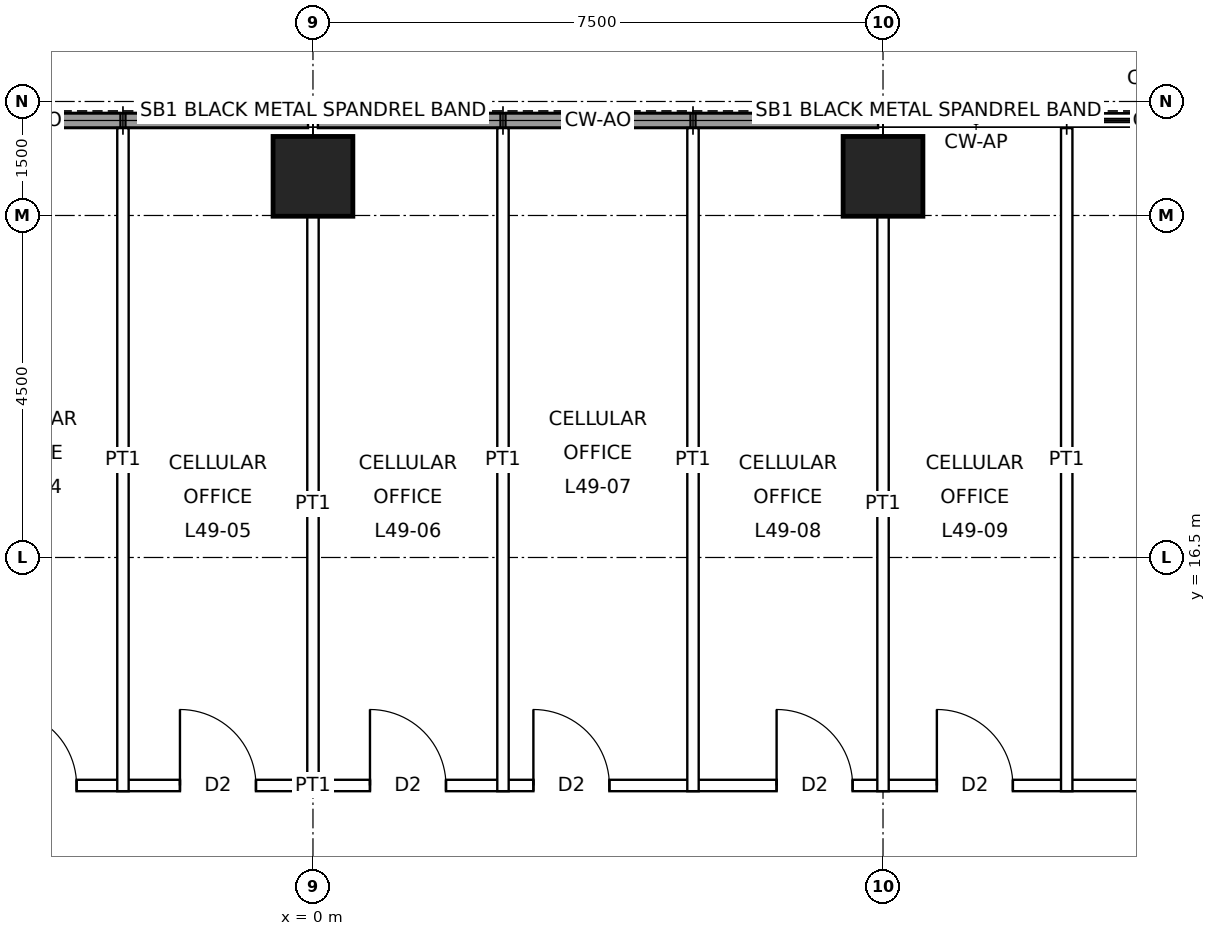
"""IFC4 building model, lengths in metres.
Left out: names, types, materials, properties, quantities, classifications, styles, units other than length and angle.
Written with IfcOpenShell. Run it as: python <this file> out.ifc"""

import sys

from ifc_helpers import new_model, si_unit, direction, frame, frame_2d, origin, origin_2d, place, context, subcontext, project, spatial, rectangle, hollow_rectangle, extrude, element, fill, save


model = new_model("IFC4")
c1 = context("Model", 3, precision=1e-05, world=origin(), true_north=direction((0.0, 1.0)))
c2 = subcontext(c1, "Body", "Model", "MODEL_VIEW")
j1 = project(units=[si_unit("LENGTHUNIT", "METRE"), si_unit("PLANEANGLEUNIT", "RADIAN")], contexts=[c1])
p1 = place(None, origin())
s1 = spatial("IfcSite", under=j1, at=p1, CompositionType="ELEMENT")
p2 = place(p1, origin())
s2 = spatial("IfcBuilding", under=s1, at=p2, CompositionType="ELEMENT")
p3 = place(p2, frame((0.0, 0.0, 229.9)))
s3 = spatial("IfcBuildingStorey", under=s2, at=p3, CompositionType="ELEMENT", Elevation=229.9)
for number, where, z_axis, x_axis in (
    (1, (0.0, 21.515, 0.0), (0.0, 0.0, 1.0), (1.0, 0.0, 0.0)),
    (2, (7.5, 21.515, 0.0), (0.0, 0.0, 1.0), (1.0, 0.0, 0.0)),
):
    element("IfcColumn", number, at=place(p3, frame(where, z_axis=z_axis, x_axis=x_axis)), inside=s3, PredefinedType="COLUMN", context=c2, shape_type="SweptSolid", body=[
        extrude(hollow_rectangle(XDim=1.05, YDim=1.05, WallThickness=0.07, at=origin_2d()), origin(), (0.0, 0.0, 1.0), 4.0),
    ])
p4 = place(p3, frame((-4.968, 22.25, 0.0), z_axis=(0.0, 0.0, 1.0), x_axis=(1.0, 0.0, 0.0)))
e3 = element("IfcWall", 3, at=p4, inside=s3, PredefinedType="SOLIDWALL", context=c2, shape_type="SweptSolid", body=[
    extrude(rectangle(XDim=2.435, YDim=0.2, at=frame_2d((1.218, 0.0))), origin(), (0.0, 0.0, 1.0), 3.85),
])
for number, where, z_axis, x_axis in (
    (4, (-2.468, 22.25, 0.0), (0.0, 0.0, 1.0), (1.0, 0.0, 0.0)),
    (5, (0.065, 22.25, 0.0), (0.0, 0.0, 1.0), (1.0, 0.0, 0.0)),
):
    element("IfcWall", number, at=place(p3, frame(where, z_axis=z_axis, x_axis=x_axis)), inside=s3, PredefinedType="SOLIDWALL", context=c2, shape_type="SweptSolid", body=[
        extrude(rectangle(XDim=2.403, YDim=0.2, at=frame_2d((1.201, 0.0))), origin(), (0.0, 0.0, 1.0), 3.85),
    ])
p5 = place(p3, frame((2.532, 22.25, 0.0), z_axis=(0.0, 0.0, 1.0), x_axis=(1.0, 0.0, 0.0)))
e6 = element("IfcWall", 6, at=p5, inside=s3, PredefinedType="SOLIDWALL", context=c2, shape_type="SweptSolid", body=[
    extrude(rectangle(XDim=2.435, YDim=0.2, at=frame_2d((1.218, 0.0))), origin(), (0.0, 0.0, 1.0), 3.85),
])
p6 = place(p3, frame((5.032, 22.25, 0.0), z_axis=(0.0, 0.0, 1.0), x_axis=(1.0, 0.0, 0.0)))
e7 = element("IfcWall", 7, at=p6, inside=s3, PredefinedType="SOLIDWALL", context=c2, shape_type="SweptSolid", body=[
    extrude(rectangle(XDim=2.403, YDim=0.2, at=frame_2d((1.201, 0.0))), origin(), (0.0, 0.0, 1.0), 3.85),
])
p7 = place(p3, frame((-13.575, 13.5, 0.0), z_axis=(0.0, 0.0, 1.0), x_axis=(1.0, 0.0, 0.0)))
e8 = element("IfcWall", 8, at=p7, inside=s3, PredefinedType="PARTITIONING", context=c2, shape_type="SweptSolid", body=[
    extrude(rectangle(XDim=27.15, YDim=0.15, at=frame_2d((13.575, 0.0))), origin(), (0.0, 0.0, 1.0), 3.85),
])
p8 = place(p7, frame((4.366, 0.0, 0.0)))
e9 = element("IfcOpeningElement", 9, at=p8, cuts=e8, PredefinedType="OPENING", context=c2, shape_type="SweptSolid", body=[
    extrude(rectangle(XDim=1.0, YDim=2.1, at=frame_2d((0.5, 1.05))), frame((0.0, 0.085, 0.0), z_axis=(0.0, -1.0, 0.0), x_axis=(1.0, 0.0, 0.0)), (0.0, 0.0, 1.0), 0.17),
])
p9 = place(p7, frame((6.475, 0.0, 0.0)))
e10 = element("IfcOpeningElement", 10, at=p9, cuts=e8, PredefinedType="OPENING", context=c2, shape_type="SweptSolid", body=[
    extrude(rectangle(XDim=1.0, YDim=2.1, at=frame_2d((0.5, 1.05))), frame((0.0, 0.085, 0.0), z_axis=(0.0, -1.0, 0.0), x_axis=(1.0, 0.0, 0.0)), (0.0, 0.0, 1.0), 0.17),
])
p10 = place(p7, frame((9.465, 0.0, 0.0)))
e11 = element("IfcOpeningElement", 11, at=p10, cuts=e8, PredefinedType="OPENING", context=c2, shape_type="SweptSolid", body=[
    extrude(rectangle(XDim=1.0, YDim=2.1, at=frame_2d((0.5, 1.05))), frame((0.0, 0.085, 0.0), z_axis=(0.0, -1.0, 0.0), x_axis=(1.0, 0.0, 0.0)), (0.0, 0.0, 1.0), 0.17),
])
p11 = place(p7, frame((11.825, 0.0, 0.0)))
e12 = element("IfcOpeningElement", 12, at=p11, cuts=e8, PredefinedType="OPENING", context=c2, shape_type="SweptSolid", body=[
    extrude(rectangle(XDim=1.0, YDim=2.1, at=frame_2d((0.5, 1.05))), frame((0.0, 0.085, 0.0), z_axis=(0.0, -1.0, 0.0), x_axis=(1.0, 0.0, 0.0)), (0.0, 0.0, 1.0), 0.17),
])
p12 = place(p7, frame((14.325, 0.0, 0.0)))
e13 = element("IfcOpeningElement", 13, at=p12, cuts=e8, PredefinedType="OPENING", context=c2, shape_type="SweptSolid", body=[
    extrude(rectangle(XDim=1.0, YDim=2.1, at=frame_2d((0.5, 1.05))), frame((0.0, 0.085, 0.0), z_axis=(0.0, -1.0, 0.0), x_axis=(1.0, 0.0, 0.0)), (0.0, 0.0, 1.0), 0.17),
])
p13 = place(p7, frame((16.475, 0.0, 0.0)))
e14 = element("IfcOpeningElement", 14, at=p13, cuts=e8, PredefinedType="OPENING", context=c2, shape_type="SweptSolid", body=[
    extrude(rectangle(XDim=1.0, YDim=2.1, at=frame_2d((0.5, 1.05))), frame((0.0, 0.085, 0.0), z_axis=(0.0, -1.0, 0.0), x_axis=(1.0, 0.0, 0.0)), (0.0, 0.0, 1.0), 0.17),
])
p14 = place(p7, frame((19.675, 0.0, 0.0)))
e15 = element("IfcOpeningElement", 15, at=p14, cuts=e8, PredefinedType="OPENING", context=c2, shape_type="SweptSolid", body=[
    extrude(rectangle(XDim=1.0, YDim=2.1, at=frame_2d((0.5, 1.05))), frame((0.0, 0.085, 0.0), z_axis=(0.0, -1.0, 0.0), x_axis=(1.0, 0.0, 0.0)), (0.0, 0.0, 1.0), 0.17),
])
p15 = place(p7, frame((21.783, 0.0, 0.0)))
e16 = element("IfcOpeningElement", 16, at=p15, cuts=e8, PredefinedType="OPENING", context=c2, shape_type="SweptSolid", body=[
    extrude(rectangle(XDim=1.0, YDim=2.1, at=frame_2d((0.5, 1.05))), frame((0.0, 0.085, 0.0), z_axis=(0.0, -1.0, 0.0), x_axis=(1.0, 0.0, 0.0)), (0.0, 0.0, 1.0), 0.17),
])
p16 = place(p7, frame((24.783, 0.0, 0.0)))
e17 = element("IfcOpeningElement", 17, at=p16, cuts=e8, PredefinedType="OPENING", context=c2, shape_type="SweptSolid", body=[
    extrude(rectangle(XDim=1.0, YDim=2.4, at=frame_2d((0.5, 1.2))), frame((0.0, 0.085, 0.0), z_axis=(0.0, -1.0, 0.0), x_axis=(1.0, 0.0, 0.0)), (0.0, 0.0, 1.0), 0.17),
])
p17 = place(p7, frame((1.366, 0.0, 0.0)))
e18 = element("IfcOpeningElement", 18, at=p17, cuts=e8, PredefinedType="OPENING", context=c2, shape_type="SweptSolid", body=[
    extrude(rectangle(XDim=1.0, YDim=2.4, at=frame_2d((0.5, 1.2))), frame((0.0, 0.085, 0.0), z_axis=(0.0, -1.0, 0.0), x_axis=(1.0, 0.0, 0.0)), (0.0, 0.0, 1.0), 0.17),
])
p18 = place(p3, frame((-2.5, 13.425, 0.0), z_axis=(0.0, 0.0, 1.0), x_axis=(0.0, 1.0, 0.0)))
e19 = element("IfcWall", 19, at=p18, inside=s3, PredefinedType="PARTITIONING", context=c2, shape_type="SweptSolid", body=[
    extrude(rectangle(XDim=8.725, YDim=0.15, at=frame_2d((4.362, 0.0))), origin(), (0.0, 0.0, 1.0), 3.85),
])
p19 = place(p3, frame((0.0, 13.425, 0.0), z_axis=(0.0, 0.0, 1.0), x_axis=(0.0, 1.0, 0.0)))
e20 = element("IfcWall", 20, at=p19, inside=s3, PredefinedType="PARTITIONING", context=c2, shape_type="SweptSolid", body=[
    extrude(rectangle(XDim=7.565, YDim=0.15, at=frame_2d((3.782, 0.0))), origin(), (0.0, 0.0, 1.0), 3.238),
])
for number, where, z_axis, x_axis in (
    (21, (2.5, 13.425, 0.0), (0.0, 0.0, 1.0), (0.0, 1.0, 0.0)),
    (22, (5.0, 13.425, 0.0), (0.0, 0.0, 1.0), (0.0, 1.0, 0.0)),
):
    element("IfcWall", number, at=place(p3, frame(where, z_axis=z_axis, x_axis=x_axis)), inside=s3, PredefinedType="PARTITIONING", context=c2, shape_type="SweptSolid", body=[
        extrude(rectangle(XDim=8.725, YDim=0.15, at=frame_2d((4.362, 0.0))), origin(), (0.0, 0.0, 1.0), 3.85),
    ])
p20 = place(p3, frame((7.5, 13.425, 0.0), z_axis=(0.0, 0.0, 1.0), x_axis=(0.0, 1.0, 0.0)))
e23 = element("IfcWall", 23, at=p20, inside=s3, PredefinedType="PARTITIONING", context=c2, shape_type="SweptSolid", body=[
    extrude(rectangle(XDim=7.565, YDim=0.15, at=frame_2d((3.782, 0.0))), origin(), (0.0, 0.0, 1.0), 3.238),
])
p21 = place(p3, frame((9.917, 13.425, 0.0), z_axis=(0.0, 0.0, 1.0), x_axis=(0.0, 1.0, 0.0)))
e24 = element("IfcWall", 24, at=p21, inside=s3, PredefinedType="PARTITIONING", context=c2, shape_type="SweptSolid", body=[
    extrude(rectangle(XDim=8.725, YDim=0.15, at=frame_2d((4.362, 0.0))), origin(), (0.0, 0.0, 1.0), 3.85),
])
p22 = place(p10, origin())
e25 = element("IfcDoor", 25, at=p22, inside=s3, OperationType="SINGLE_SWING_LEFT", PredefinedType="DOOR", context=c2, shape_type="SweptSolid", body=[
    extrude(rectangle(XDim=1.0, YDim=2.1, at=frame_2d((0.5, 1.05))), frame((0.0, 0.025, 0.0), z_axis=(0.0, -1.0, 0.0), x_axis=(1.0, 0.0, 0.0)), (0.0, 0.0, 1.0), 0.05),
])
fill(e11, e25)
p23 = place(p11, origin())
e26 = element("IfcDoor", 26, at=p23, inside=s3, OperationType="SINGLE_SWING_LEFT", PredefinedType="DOOR", context=c2, shape_type="SweptSolid", body=[
    extrude(rectangle(XDim=1.0, YDim=2.1, at=frame_2d((0.5, 1.05))), frame((0.0, 0.025, 0.0), z_axis=(0.0, -1.0, 0.0), x_axis=(1.0, 0.0, 0.0)), (0.0, 0.0, 1.0), 0.05),
])
fill(e12, e26)
p24 = place(p12, origin())
e27 = element("IfcDoor", 27, at=p24, inside=s3, OperationType="SINGLE_SWING_LEFT", PredefinedType="DOOR", context=c2, shape_type="SweptSolid", body=[
    extrude(rectangle(XDim=1.0, YDim=2.1, at=frame_2d((0.5, 1.05))), frame((0.0, 0.025, 0.0), z_axis=(0.0, -1.0, 0.0), x_axis=(1.0, 0.0, 0.0)), (0.0, 0.0, 1.0), 0.05),
])
fill(e13, e27)
p25 = place(p13, origin())
e28 = element("IfcDoor", 28, at=p25, inside=s3, OperationType="SINGLE_SWING_LEFT", PredefinedType="DOOR", context=c2, shape_type="SweptSolid", body=[
    extrude(rectangle(XDim=1.0, YDim=2.1, at=frame_2d((0.5, 1.05))), frame((0.0, 0.025, 0.0), z_axis=(0.0, -1.0, 0.0), x_axis=(1.0, 0.0, 0.0)), (0.0, 0.0, 1.0), 0.05),
])
fill(e14, e28)
p26 = place(p14, origin())
e29 = element("IfcDoor", 29, at=p26, inside=s3, OperationType="SINGLE_SWING_LEFT", PredefinedType="DOOR", context=c2, shape_type="SweptSolid", body=[
    extrude(rectangle(XDim=1.0, YDim=2.1, at=frame_2d((0.5, 1.05))), frame((0.0, 0.025, 0.0), z_axis=(0.0, -1.0, 0.0), x_axis=(1.0, 0.0, 0.0)), (0.0, 0.0, 1.0), 0.05),
])
fill(e15, e29)
p27 = place(p15, origin())
e30 = element("IfcDoor", 30, at=p27, inside=s3, OperationType="SINGLE_SWING_LEFT", PredefinedType="DOOR", context=c2, shape_type="SweptSolid", body=[
    extrude(rectangle(XDim=1.0, YDim=2.1, at=frame_2d((0.5, 1.05))), frame((0.0, 0.025, 0.0), z_axis=(0.0, -1.0, 0.0), x_axis=(1.0, 0.0, 0.0)), (0.0, 0.0, 1.0), 0.05),
])
fill(e16, e30)
save(model, sys.argv[1])
